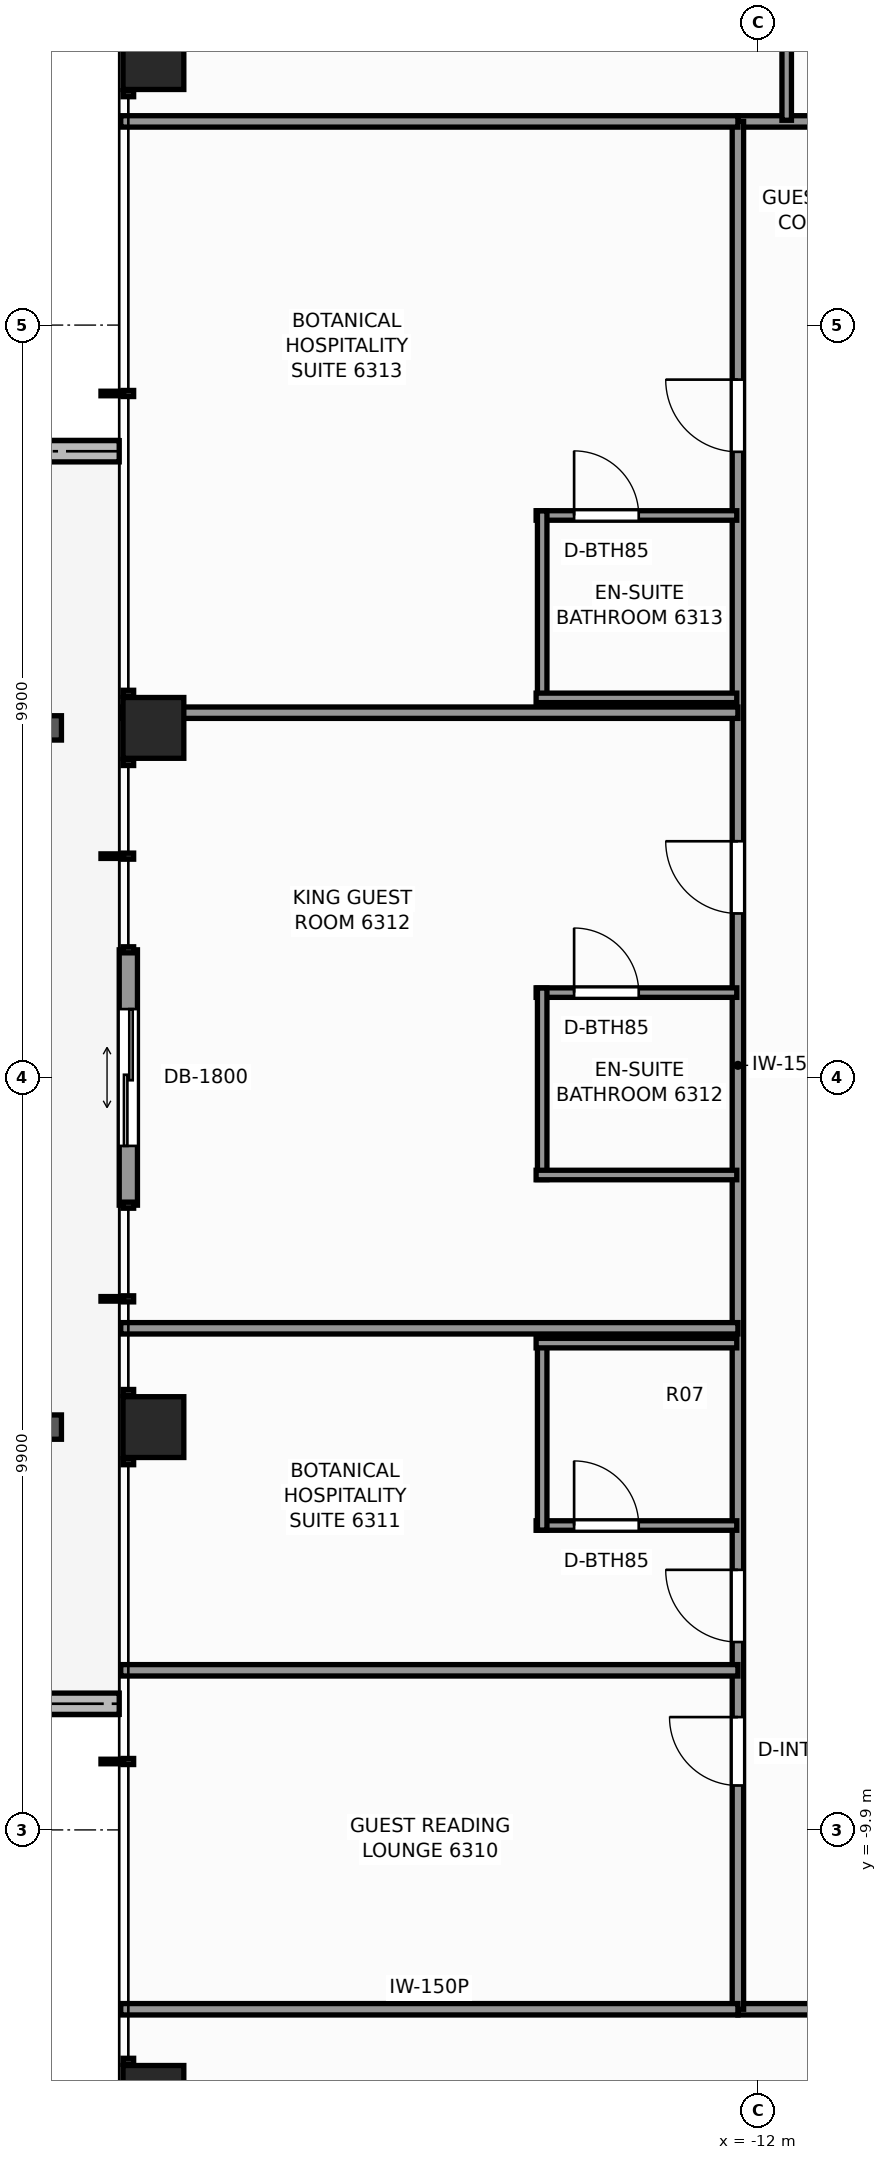
"""IFC4 building model, lengths in metres.
Left out: names, types, materials, properties, quantities, classifications, styles, units other than length and angle.
Written with IfcOpenShell. Run it as: python <this file> out.ifc"""

import sys

from ifc_helpers import new_model, si_unit, direction, frame, frame_2d, origin, origin_2d, place, context, subcontext, project, spatial, rectangle, extrude, element, fill, save


model = new_model("IFC4")
c1 = context("Model", 3, precision=1e-05, world=origin(), true_north=direction((0.0, 1.0)))
c2 = subcontext(c1, "Body", "Model", "MODEL_VIEW")
j1 = project(units=[si_unit("LENGTHUNIT", "METRE"), si_unit("PLANEANGLEUNIT", "RADIAN")], contexts=[c1])
p1 = place(None, origin())
s1 = spatial("IfcSite", under=j1, at=p1, CompositionType="ELEMENT")
p2 = place(p1, origin())
s2 = spatial("IfcBuilding", under=s1, at=p2, CompositionType="ELEMENT")
p3 = place(p2, frame((0.0, 0.0, 216.3)))
s3 = spatial("IfcBuildingStorey", under=s2, at=p3, CompositionType="ELEMENT", Elevation=216.3)
for number, where, z_axis, x_axis in (
    (1, (-19.95, -13.4, 0.0), (0.0, 0.0, 1.0), (1.0, 0.0, 0.0)),
    (2, (-19.95, -4.6, 0.0), (0.0, 0.0, 1.0), (1.0, 0.0, 0.0)),
    (3, (-19.95, 4.6, 0.0), (0.0, 0.0, 1.0), (1.0, 0.0, 0.0)),
    (4, (-19.95, 13.4, 0.0), (0.0, 0.0, 1.0), (1.0, 0.0, 0.0)),
):
    element("IfcColumn", number, at=place(p3, frame(where, z_axis=z_axis, x_axis=x_axis)), inside=s3, PredefinedType="COLUMN", context=c2, shape_type="SweptSolid", body=[
        extrude(rectangle(XDim=0.8, YDim=0.8, at=origin_2d()), origin(), (0.0, 0.0, 1.0), 3.3),
    ])
p4 = place(p3, frame((-23.614, -8.24, -0.04), z_axis=(0.0, 0.0, 1.0), x_axis=(1.0, 0.0, 0.0)))
e5 = element("IfcWall", 5, at=p4, inside=s3, PredefinedType="PARAPET", context=c2, shape_type="SweptSolid", body=[
    extrude(rectangle(XDim=3.214, YDim=0.28, at=frame_2d((1.607, 0.0))), origin(), (0.0, 0.0, 1.0), 0.42),
])
p5 = place(p3, frame((-20.4, 8.24, -0.04), z_axis=(0.0, 0.0, 1.0), x_axis=(-1.0, 0.0, 0.0)))
e6 = element("IfcWall", 6, at=p5, inside=s3, PredefinedType="PARAPET", context=c2, shape_type="SweptSolid", body=[
    extrude(rectangle(XDim=3.42, YDim=0.28, at=frame_2d((1.71, 0.0))), origin(), (0.0, 0.0, 1.0), 0.42),
])
p6 = place(p3, frame((-20.28, -1.68, 0.0), z_axis=(0.0, 0.0, 1.0), x_axis=(0.0, 1.0, 0.0)))
e7 = element("IfcWall", 7, at=p6, inside=s3, PredefinedType="STANDARD", context=c2, shape_type="SweptSolid", body=[
    extrude(rectangle(XDim=3.36, YDim=0.24, at=frame_2d((1.68, 0.0))), origin(), (0.0, 0.0, 1.0), 3.08),
])
p7 = place(p6, frame((0.78, 0.0, 0.0)))
e8 = element("IfcOpeningElement", 8, at=p7, cuts=e7, PredefinedType="OPENING", context=c2, shape_type="SweptSolid", body=[
    extrude(rectangle(XDim=1.8, YDim=2.2, at=frame_2d((0.9, 1.1))), frame((0.0, 0.13, 0.0), z_axis=(0.0, -1.0, 0.0), x_axis=(1.0, 0.0, 0.0)), (0.0, 0.0, 1.0), 0.26),
])
p8 = place(p3, frame((-12.26, -12.26, 0.0), z_axis=(0.0, 0.0, 1.0), x_axis=(1.0, 0.0, 0.0)))
e9 = element("IfcWall", 9, at=p8, inside=s3, PredefinedType="PARTITIONING", context=c2, shape_type="SweptSolid", body=[
    extrude(rectangle(XDim=24.52, YDim=0.15, at=frame_2d((12.26, 0.0))), origin(), (0.0, 0.0, 1.0), 2.369),
])
p9 = place(p8, frame((3.427, 0.0, 0.0)))
e10 = element("IfcOpeningElement", 10, at=p9, cuts=e9, PredefinedType="OPENING", context=c2, shape_type="SweptSolid", body=[
    extrude(rectangle(XDim=0.9, YDim=2.06, at=frame_2d((0.45, 1.03))), frame((0.0, 0.085, 0.0), z_axis=(0.0, -1.0, 0.0), x_axis=(1.0, 0.0, 0.0)), (0.0, 0.0, 1.0), 0.17),
])
p10 = place(p8, frame((5.762, 0.0, 0.0)))
e11 = element("IfcOpeningElement", 11, at=p10, cuts=e9, PredefinedType="OPENING", context=c2, shape_type="SweptSolid", body=[
    extrude(rectangle(XDim=0.9, YDim=2.06, at=frame_2d((0.45, 1.03))), frame((0.0, 0.085, 0.0), z_axis=(0.0, -1.0, 0.0), x_axis=(1.0, 0.0, 0.0)), (0.0, 0.0, 1.0), 0.17),
])
p11 = place(p8, frame((9.473, 0.0, 0.0)))
e12 = element("IfcOpeningElement", 12, at=p11, cuts=e9, PredefinedType="OPENING", context=c2, shape_type="SweptSolid", body=[
    extrude(rectangle(XDim=0.9, YDim=2.06, at=frame_2d((0.45, 1.03))), frame((0.0, 0.085, 0.0), z_axis=(0.0, -1.0, 0.0), x_axis=(1.0, 0.0, 0.0)), (0.0, 0.0, 1.0), 0.17),
])
p12 = place(p8, frame((12.875, 0.0, 0.0)))
e13 = element("IfcOpeningElement", 13, at=p12, cuts=e9, PredefinedType="OPENING", context=c2, shape_type="SweptSolid", body=[
    extrude(rectangle(XDim=0.95, YDim=2.06, at=frame_2d((0.475, 1.03))), frame((0.0, 0.085, 0.0), z_axis=(0.0, -1.0, 0.0), x_axis=(1.0, 0.0, 0.0)), (0.0, 0.0, 1.0), 0.17),
])
p13 = place(p8, frame((18.625, 0.0, 0.0)))
e14 = element("IfcOpeningElement", 14, at=p13, cuts=e9, PredefinedType="OPENING", context=c2, shape_type="SweptSolid", body=[
    extrude(rectangle(XDim=0.9, YDim=2.06, at=frame_2d((0.45, 1.03))), frame((0.0, 0.085, 0.0), z_axis=(0.0, -1.0, 0.0), x_axis=(1.0, 0.0, 0.0)), (0.0, 0.0, 1.0), 0.17),
])
p14 = place(p8, frame((20.959, 0.0, 0.0)))
e15 = element("IfcOpeningElement", 15, at=p14, cuts=e9, PredefinedType="OPENING", context=c2, shape_type="SweptSolid", body=[
    extrude(rectangle(XDim=0.9, YDim=2.06, at=frame_2d((0.45, 1.03))), frame((0.0, 0.085, 0.0), z_axis=(0.0, -1.0, 0.0), x_axis=(1.0, 0.0, 0.0)), (0.0, 0.0, 1.0), 0.17),
])
p15 = place(p3, frame((-12.26, 12.58, 0.0), z_axis=(0.0, 0.0, 1.0), x_axis=(1.0, 0.0, 0.0)))
e16 = element("IfcWall", 16, at=p15, inside=s3, PredefinedType="PARTITIONING", context=c2, shape_type="SweptSolid", body=[
    extrude(rectangle(XDim=24.52, YDim=0.15, at=frame_2d((12.26, 0.0))), origin(), (0.0, 0.0, 1.0), 2.369),
])
p16 = place(p15, frame((3.803, 0.0, 0.0)))
e17 = element("IfcOpeningElement", 17, at=p16, cuts=e16, PredefinedType="OPENING", context=c2, shape_type="SweptSolid", body=[
    extrude(rectangle(XDim=0.95, YDim=2.06, at=frame_2d((0.475, 1.03))), frame((0.0, 0.085, 0.0), z_axis=(0.0, -1.0, 0.0), x_axis=(1.0, 0.0, 0.0)), (0.0, 0.0, 1.0), 0.17),
])
p17 = place(p15, frame((5.762, 0.0, 0.0)))
e18 = element("IfcOpeningElement", 18, at=p17, cuts=e16, PredefinedType="OPENING", context=c2, shape_type="SweptSolid", body=[
    extrude(rectangle(XDim=0.9, YDim=2.06, at=frame_2d((0.45, 1.03))), frame((0.0, 0.085, 0.0), z_axis=(0.0, -1.0, 0.0), x_axis=(1.0, 0.0, 0.0)), (0.0, 0.0, 1.0), 0.17),
])
p18 = place(p15, frame((13.518, 0.0, 0.0)))
e19 = element("IfcOpeningElement", 19, at=p18, cuts=e16, PredefinedType="OPENING", context=c2, shape_type="SweptSolid", body=[
    extrude(rectangle(XDim=0.95, YDim=2.06, at=frame_2d((0.475, 1.03))), frame((0.0, 0.085, 0.0), z_axis=(0.0, -1.0, 0.0), x_axis=(1.0, 0.0, 0.0)), (0.0, 0.0, 1.0), 0.17),
])
p19 = place(p15, frame((17.858, 0.0, 0.0)))
e20 = element("IfcOpeningElement", 20, at=p19, cuts=e16, PredefinedType="OPENING", context=c2, shape_type="SweptSolid", body=[
    extrude(rectangle(XDim=0.9, YDim=2.06, at=frame_2d((0.45, 1.03))), frame((0.0, 0.085, 0.0), z_axis=(0.0, -1.0, 0.0), x_axis=(1.0, 0.0, 0.0)), (0.0, 0.0, 1.0), 0.17),
])
p20 = place(p15, frame((19.767, 0.0, 0.0)))
e21 = element("IfcOpeningElement", 21, at=p20, cuts=e16, PredefinedType="OPENING", context=c2, shape_type="SweptSolid", body=[
    extrude(rectangle(XDim=0.95, YDim=2.06, at=frame_2d((0.475, 1.03))), frame((0.0, 0.085, 0.0), z_axis=(0.0, -1.0, 0.0), x_axis=(1.0, 0.0, 0.0)), (0.0, 0.0, 1.0), 0.17),
])
p21 = place(p3, frame((-12.26, -12.26, 0.0), z_axis=(0.0, 0.0, 1.0), x_axis=(0.0, 1.0, 0.0)))
e22 = element("IfcWall", 22, at=p21, inside=s3, PredefinedType="PARTITIONING", context=c2, shape_type="SweptSolid", body=[
    extrude(rectangle(XDim=24.84, YDim=0.15, at=frame_2d((12.42, 0.0))), origin(), (0.0, 0.0, 1.0), 2.369),
])
p22 = place(p21, frame((2.944, 0.0, 0.0)))
e23 = element("IfcOpeningElement", 23, at=p22, cuts=e22, PredefinedType="OPENING", context=c2, shape_type="SweptSolid", body=[
    extrude(rectangle(XDim=0.9, YDim=2.06, at=frame_2d((0.45, 1.03))), frame((0.0, 0.085, 0.0), z_axis=(0.0, -1.0, 0.0), x_axis=(1.0, 0.0, 0.0)), (0.0, 0.0, 1.0), 0.17),
])
p23 = place(p21, frame((4.832, 0.0, 0.0)))
e24 = element("IfcOpeningElement", 24, at=p23, cuts=e22, PredefinedType="OPENING", context=c2, shape_type="SweptSolid", body=[
    extrude(rectangle(XDim=0.95, YDim=2.06, at=frame_2d((0.475, 1.03))), frame((0.0, 0.085, 0.0), z_axis=(0.0, -1.0, 0.0), x_axis=(1.0, 0.0, 0.0)), (0.0, 0.0, 1.0), 0.17),
])
p24 = place(p21, frame((14.418, 0.0, 0.0)))
e25 = element("IfcOpeningElement", 25, at=p24, cuts=e22, PredefinedType="OPENING", context=c2, shape_type="SweptSolid", body=[
    extrude(rectangle(XDim=0.95, YDim=2.06, at=frame_2d((0.475, 1.03))), frame((0.0, 0.085, 0.0), z_axis=(0.0, -1.0, 0.0), x_axis=(1.0, 0.0, 0.0)), (0.0, 0.0, 1.0), 0.17),
])
p25 = place(p21, frame((20.492, 0.0, 0.0)))
e26 = element("IfcOpeningElement", 26, at=p25, cuts=e22, PredefinedType="OPENING", context=c2, shape_type="SweptSolid", body=[
    extrude(rectangle(XDim=0.95, YDim=2.06, at=frame_2d((0.475, 1.03))), frame((0.0, 0.085, 0.0), z_axis=(0.0, -1.0, 0.0), x_axis=(1.0, 0.0, 0.0)), (0.0, 0.0, 1.0), 0.17),
])
for number, where, z_axis, x_axis in (
    (27, (-20.38, -12.26, 0.0), (0.0, 0.0, 1.0), (1.0, 0.0, 0.0)),
    (28, (-20.38, 12.58, 0.0), (0.0, 0.0, 1.0), (1.0, 0.0, 0.0)),
):
    element("IfcWall", number, at=place(p3, frame(where, z_axis=z_axis, x_axis=x_axis)), inside=s3, PredefinedType="PARTITIONING", context=c2, shape_type="SweptSolid", body=[
        extrude(rectangle(XDim=8.12, YDim=0.15, at=frame_2d((4.06, 0.0))), origin(), (0.0, 0.0, 1.0), 2.369),
    ])
for number, where, z_axis, x_axis in (
    (29, (-20.38, -7.8, 0.0), (0.0, 0.0, 1.0), (1.0, 0.0, 0.0)),
    (30, (-20.38, -3.3, 0.0), (0.0, 0.0, 1.0), (1.0, 0.0, 0.0)),
):
    element("IfcWall", number, at=place(p3, frame(where, z_axis=z_axis, x_axis=x_axis)), inside=s3, PredefinedType="PARTITIONING", context=c2, shape_type="SweptSolid", body=[
        extrude(rectangle(XDim=8.12, YDim=0.15, at=frame_2d((4.06, 0.0))), origin(), (0.0, 0.0, 1.0), 2.453),
    ])
p26 = place(p3, frame((-14.915, -5.895, 0.0), z_axis=(0.0, 0.0, 1.0), x_axis=(1.0, 0.0, 0.0)))
e31 = element("IfcWall", 31, at=p26, inside=s3, PredefinedType="PARTITIONING", context=c2, shape_type="SweptSolid", body=[
    extrude(rectangle(XDim=2.64, YDim=0.125, at=frame_2d((1.32, 0.0))), origin(), (0.0, 0.0, 1.0), 3.08),
])
p27 = place(p26, frame((0.5, 0.0, 0.0)))
e32 = element("IfcOpeningElement", 32, at=p27, cuts=e31, PredefinedType="OPENING", context=c2, shape_type="SweptSolid", body=[
    extrude(rectangle(XDim=0.85, YDim=2.03, at=frame_2d((0.425, 1.015))), frame((0.0, 0.073, 0.0), z_axis=(0.0, -1.0, 0.0), x_axis=(1.0, 0.0, 0.0)), (0.0, 0.0, 1.0), 0.145),
])
p28 = place(p3, frame((-14.835, -5.955, 0.0), z_axis=(0.0, 0.0, 1.0), x_axis=(0.0, 1.0, 0.0)))
e33 = element("IfcWall", 33, at=p28, inside=s3, PredefinedType="PARTITIONING", context=c2, shape_type="SweptSolid", body=[
    extrude(rectangle(XDim=2.52, YDim=0.125, at=frame_2d((1.26, 0.0))), origin(), (0.0, 0.0, 1.0), 2.369),
])
p29 = place(p3, frame((-14.915, -3.495, 0.0), z_axis=(0.0, 0.0, 1.0), x_axis=(1.0, 0.0, 0.0)))
e34 = element("IfcWall", 34, at=p29, inside=s3, PredefinedType="PARTITIONING", context=c2, shape_type="SweptSolid", body=[
    extrude(rectangle(XDim=2.64, YDim=0.125, at=frame_2d((1.32, 0.0))), origin(), (0.0, 0.0, 1.0), 3.08),
])
p30 = place(p3, frame((-20.38, 4.8, 0.0), z_axis=(0.0, 0.0, 1.0), x_axis=(1.0, 0.0, 0.0)))
e35 = element("IfcWall", 35, at=p30, inside=s3, PredefinedType="PARTITIONING", context=c2, shape_type="SweptSolid", body=[
    extrude(rectangle(XDim=8.12, YDim=0.15, at=frame_2d((4.06, 0.0))), origin(), (0.0, 0.0, 1.0), 2.369),
])
p31 = place(p3, frame((-14.915, 1.117, 0.0), z_axis=(0.0, 0.0, 1.0), x_axis=(1.0, 0.0, 0.0)))
e36 = element("IfcWall", 36, at=p31, inside=s3, PredefinedType="PARTITIONING", context=c2, shape_type="SweptSolid", body=[
    extrude(rectangle(XDim=2.64, YDim=0.125, at=frame_2d((1.32, 0.0))), origin(), (0.0, 0.0, 1.0), 3.08),
])
p32 = place(p31, frame((0.5, 0.0, 0.0)))
e37 = element("IfcOpeningElement", 37, at=p32, cuts=e36, PredefinedType="OPENING", context=c2, shape_type="SweptSolid", body=[
    extrude(rectangle(XDim=0.85, YDim=2.03, at=frame_2d((0.425, 1.015))), frame((0.0, 0.073, 0.0), z_axis=(0.0, -1.0, 0.0), x_axis=(1.0, 0.0, 0.0)), (0.0, 0.0, 1.0), 0.145),
])
p33 = place(p3, frame((-14.835, -1.343, 0.0), z_axis=(0.0, 0.0, 1.0), x_axis=(0.0, 1.0, 0.0)))
e38 = element("IfcWall", 38, at=p33, inside=s3, PredefinedType="PARTITIONING", context=c2, shape_type="SweptSolid", body=[
    extrude(rectangle(XDim=2.52, YDim=0.125, at=frame_2d((1.26, 0.0))), origin(), (0.0, 0.0, 1.0), 2.605),
])
p34 = place(p3, frame((-14.915, -1.283, 0.0), z_axis=(0.0, 0.0, 1.0), x_axis=(1.0, 0.0, 0.0)))
e39 = element("IfcWall", 39, at=p34, inside=s3, PredefinedType="PARTITIONING", context=c2, shape_type="SweptSolid", body=[
    extrude(rectangle(XDim=2.64, YDim=0.125, at=frame_2d((1.32, 0.0))), origin(), (0.0, 0.0, 1.0), 3.08),
])
p35 = place(p3, frame((-14.915, 7.395, 0.0), z_axis=(0.0, 0.0, 1.0), x_axis=(1.0, 0.0, 0.0)))
e40 = element("IfcWall", 40, at=p35, inside=s3, PredefinedType="PARTITIONING", context=c2, shape_type="SweptSolid", body=[
    extrude(rectangle(XDim=2.64, YDim=0.125, at=frame_2d((1.32, 0.0))), origin(), (0.0, 0.0, 1.0), 3.08),
])
p36 = place(p35, frame((0.5, 0.0, 0.0)))
e41 = element("IfcOpeningElement", 41, at=p36, cuts=e40, PredefinedType="OPENING", context=c2, shape_type="SweptSolid", body=[
    extrude(rectangle(XDim=0.85, YDim=2.03, at=frame_2d((0.425, 1.015))), frame((0.0, 0.073, 0.0), z_axis=(0.0, -1.0, 0.0), x_axis=(1.0, 0.0, 0.0)), (0.0, 0.0, 1.0), 0.145),
])
p37 = place(p3, frame((-14.835, 4.935, 0.0), z_axis=(0.0, 0.0, 1.0), x_axis=(0.0, 1.0, 0.0)))
e42 = element("IfcWall", 42, at=p37, inside=s3, PredefinedType="PARTITIONING", context=c2, shape_type="SweptSolid", body=[
    extrude(rectangle(XDim=2.52, YDim=0.125, at=frame_2d((1.26, 0.0))), origin(), (0.0, 0.0, 1.0), 3.08),
])
p38 = place(p3, frame((-14.915, 4.995, 0.0), z_axis=(0.0, 0.0, 1.0), x_axis=(1.0, 0.0, 0.0)))
e43 = element("IfcWall", 43, at=p38, inside=s3, PredefinedType="PARTITIONING", context=c2, shape_type="SweptSolid", body=[
    extrude(rectangle(XDim=2.64, YDim=0.125, at=frame_2d((1.32, 0.0))), origin(), (0.0, 0.0, 1.0), 3.08),
])
p39 = place(p3, frame((-11.618, 12.595, 0.0), z_axis=(0.0, 0.0, 1.0), x_axis=(0.0, 1.0, 0.0)))
e44 = element("IfcWall", 44, at=p39, inside=s3, PredefinedType="PARTITIONING", context=c2, shape_type="SweptSolid", body=[
    extrude(rectangle(XDim=2.64, YDim=0.125, at=frame_2d((1.32, 0.0))), origin(), (0.0, 0.0, 1.0), 2.369),
])
p40 = place(p7, origin())
e45 = element("IfcDoor", 45, at=p40, inside=s3, OperationType="DOUBLE_DOOR_SLIDING", PredefinedType="DOOR", context=c2, shape_type="SweptSolid", body=[
    extrude(rectangle(XDim=1.8, YDim=2.2, at=frame_2d((0.9, 1.1))), frame((0.0, 0.025, 0.0), z_axis=(0.0, -1.0, 0.0), x_axis=(1.0, 0.0, 0.0)), (0.0, 0.0, 1.0), 0.05),
])
fill(e8, e45)
p41 = place(p22, origin())
e46 = element("IfcDoor", 46, at=p41, inside=s3, OperationType="SINGLE_SWING_RIGHT", PredefinedType="DOOR", context=c2, shape_type="SweptSolid", body=[
    extrude(rectangle(XDim=0.9, YDim=2.06, at=frame_2d((0.45, 1.03))), frame((0.0, 0.025, 0.0), z_axis=(0.0, -1.0, 0.0), x_axis=(1.0, 0.0, 0.0)), (0.0, 0.0, 1.0), 0.05),
])
fill(e23, e46)
p42 = place(p27, origin())
e47 = element("IfcDoor", 47, at=p42, inside=s3, OperationType="SINGLE_SWING_LEFT", PredefinedType="DOOR", context=c2, shape_type="SweptSolid", body=[
    extrude(rectangle(XDim=0.85, YDim=2.03, at=frame_2d((0.425, 1.015))), frame((0.0, 0.025, 0.0), z_axis=(0.0, -1.0, 0.0), x_axis=(1.0, 0.0, 0.0)), (0.0, 0.0, 1.0), 0.05),
])
fill(e32, e47)
p43 = place(p23, origin())
e48 = element("IfcDoor", 48, at=p43, inside=s3, OperationType="SINGLE_SWING_RIGHT", PredefinedType="DOOR", context=c2, shape_type="SweptSolid", body=[
    extrude(rectangle(XDim=0.95, YDim=2.06, at=frame_2d((0.475, 1.03))), frame((0.0, 0.025, 0.0), z_axis=(0.0, -1.0, 0.0), x_axis=(1.0, 0.0, 0.0)), (0.0, 0.0, 1.0), 0.05),
])
fill(e24, e48)
p44 = place(p32, origin())
e49 = element("IfcDoor", 49, at=p44, inside=s3, OperationType="SINGLE_SWING_LEFT", PredefinedType="DOOR", context=c2, shape_type="SweptSolid", body=[
    extrude(rectangle(XDim=0.85, YDim=2.03, at=frame_2d((0.425, 1.015))), frame((0.0, 0.025, 0.0), z_axis=(0.0, -1.0, 0.0), x_axis=(1.0, 0.0, 0.0)), (0.0, 0.0, 1.0), 0.05),
])
fill(e37, e49)
p45 = place(p24, origin())
e50 = element("IfcDoor", 50, at=p45, inside=s3, OperationType="SINGLE_SWING_RIGHT", PredefinedType="DOOR", context=c2, shape_type="SweptSolid", body=[
    extrude(rectangle(XDim=0.95, YDim=2.06, at=frame_2d((0.475, 1.03))), frame((0.0, 0.025, 0.0), z_axis=(0.0, -1.0, 0.0), x_axis=(1.0, 0.0, 0.0)), (0.0, 0.0, 1.0), 0.05),
])
fill(e25, e50)
p46 = place(p36, origin())
e51 = element("IfcDoor", 51, at=p46, inside=s3, OperationType="SINGLE_SWING_LEFT", PredefinedType="DOOR", context=c2, shape_type="SweptSolid", body=[
    extrude(rectangle(XDim=0.85, YDim=2.03, at=frame_2d((0.425, 1.015))), frame((0.0, 0.025, 0.0), z_axis=(0.0, -1.0, 0.0), x_axis=(1.0, 0.0, 0.0)), (0.0, 0.0, 1.0), 0.05),
])
fill(e41, e51)
p47 = place(p25, origin())
e52 = element("IfcDoor", 52, at=p47, inside=s3, OperationType="SINGLE_SWING_RIGHT", PredefinedType="DOOR", context=c2, shape_type="SweptSolid", body=[
    extrude(rectangle(XDim=0.95, YDim=2.06, at=frame_2d((0.475, 1.03))), frame((0.0, 0.025, 0.0), z_axis=(0.0, -1.0, 0.0), x_axis=(1.0, 0.0, 0.0)), (0.0, 0.0, 1.0), 0.05),
])
fill(e26, e52)
save(model, sys.argv[1])
